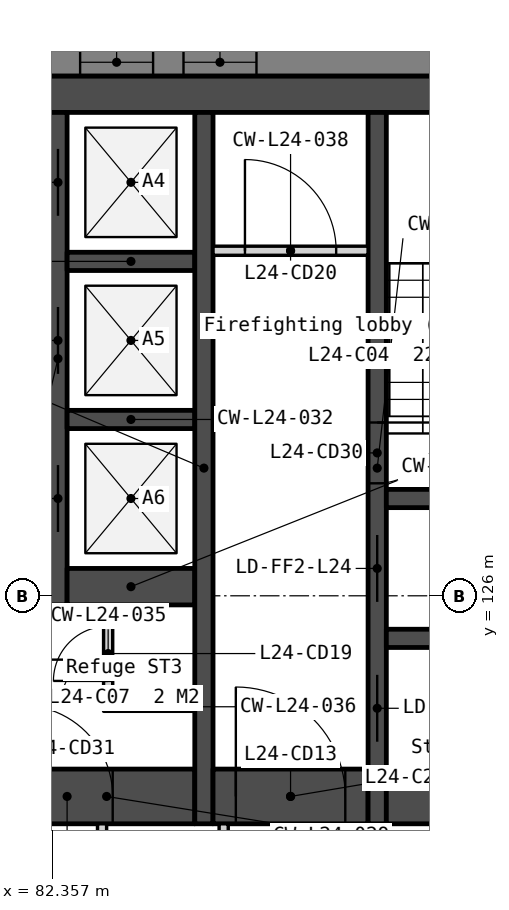
"""IFC4 building model, lengths in metres.
Left out: names, types, materials, properties, quantities, classifications, styles, units other than length and angle.
Written with IfcOpenShell. Run it as: python <this file> out.ifc"""

import sys

from ifc_helpers import new_model, si_unit, direction, frame, frame_2d, origin, place, context, subcontext, project, spatial, polyline, rectangle, outline, extrude, element, fill, save


model = new_model("IFC4")
c1 = context("Model", 3, precision=1e-05, world=origin(), true_north=direction((0.0, 1.0)))
c2 = subcontext(c1, "Body", "Model", "MODEL_VIEW")
j1 = project(units=[si_unit("LENGTHUNIT", "METRE"), si_unit("PLANEANGLEUNIT", "RADIAN")], contexts=[c1])
p1 = place(None, origin())
s1 = spatial("IfcSite", under=j1, at=p1, CompositionType="ELEMENT")
p2 = place(p1, origin())
s2 = spatial("IfcBuilding", under=s1, at=p2, CompositionType="ELEMENT")
p3 = place(p2, frame((0.0, 0.0, 99.3)))
s3 = spatial("IfcBuildingStorey", under=s2, at=p3, CompositionType="ELEMENT", Elevation=99.3)
p4 = place(p3, frame((66.0, 134.25, 0.0), z_axis=(0.0, 0.0, 1.0), x_axis=(1.0, 0.0, 0.0)))
e1 = element("IfcWall", 1, at=p4, inside=s3, PredefinedType="SOLIDWALL", context=c2, shape_type="SweptSolid", body=[
    extrude(rectangle(XDim=28.0, YDim=0.6, at=frame_2d((14.0, 0.0))), origin(), (0.0, 0.0, 1.0), 3.35),
])
p5 = place(p3, frame((81.8, 122.7, 0.0), z_axis=(0.0, 0.0, 1.0), x_axis=(1.0, 0.0, 0.0)))
e2 = element("IfcWall", 2, at=p5, inside=s3, PredefinedType="SOLIDWALL", context=c2, shape_type="SweptSolid", body=[
    extrude(rectangle(XDim=2.9, YDim=0.9, at=frame_2d((1.45, 0.0))), origin(), (0.0, 0.0, 1.0), 3.35),
])
p6 = place(p5, frame((0.05, 0.0, 0.0)))
e3 = element("IfcOpeningElement", 3, at=p6, cuts=e2, PredefinedType="OPENING", context=c2, shape_type="SweptSolid", body=[
    extrude(rectangle(XDim=1.5, YDim=2.1, at=frame_2d((0.75, 1.05))), frame((0.0, 0.46, 0.0), z_axis=(0.0, -1.0, 0.0), x_axis=(1.0, 0.0, 0.0)), (0.0, 0.0, 1.0), 0.92),
])
p7 = place(p3, frame((82.45, 133.95, 0.0), z_axis=(0.0, 0.0, 1.0), x_axis=(0.0, -1.0, 0.0)))
e4 = element("IfcWall", 4, at=p7, inside=s3, PredefinedType="SOLIDWALL", context=c2, shape_type="SweptSolid", body=[
    extrude(rectangle(XDim=8.1, YDim=0.3, at=frame_2d((4.05, 0.0))), origin(), (0.0, 0.0, 1.0), 3.35),
])
p8 = place(p7, frame((0.6, 0.0, 0.0)))
e5 = element("IfcOpeningElement", 5, at=p8, cuts=e4, PredefinedType="OPENING", context=c2, shape_type="SweptSolid", body=[
    extrude(rectangle(XDim=1.1, YDim=2.1, at=frame_2d((0.55, 1.05))), frame((0.0, 0.16, 0.0), z_axis=(0.0, -1.0, 0.0), x_axis=(1.0, 0.0, 0.0)), (0.0, 0.0, 1.0), 0.32),
])
p9 = place(p7, frame((3.2, 0.0, 0.0)))
e6 = element("IfcOpeningElement", 6, at=p9, cuts=e4, PredefinedType="OPENING", context=c2, shape_type="SweptSolid", body=[
    extrude(rectangle(XDim=1.1, YDim=2.1, at=frame_2d((0.55, 1.05))), frame((0.0, 0.16, 0.0), z_axis=(0.0, -1.0, 0.0), x_axis=(1.0, 0.0, 0.0)), (0.0, 0.0, 1.0), 0.32),
])
p10 = place(p7, frame((5.8, 0.0, 0.0)))
e7 = element("IfcOpeningElement", 7, at=p10, cuts=e4, PredefinedType="OPENING", context=c2, shape_type="SweptSolid", body=[
    extrude(rectangle(XDim=1.1, YDim=2.1, at=frame_2d((0.55, 1.05))), frame((0.0, 0.16, 0.0), z_axis=(0.0, -1.0, 0.0), x_axis=(1.0, 0.0, 0.0)), (0.0, 0.0, 1.0), 0.32),
])
for number, where, z_axis, x_axis in (
    (8, (82.6, 131.5, 0.0), (0.0, 0.0, 1.0), (1.0, 0.0, 0.0)),
    (9, (82.6, 128.9, 0.0), (0.0, 0.0, 1.0), (1.0, 0.0, 0.0)),
):
    element("IfcWall", number, at=place(p3, frame(where, z_axis=z_axis, x_axis=x_axis)), inside=s3, PredefinedType="SOLIDWALL", context=c2, shape_type="SweptSolid", body=[
        extrude(rectangle(XDim=2.1, YDim=0.3, at=frame_2d((1.05, 0.0))), origin(), (0.0, 0.0, 1.0), 3.35),
    ])
p11 = place(p3, frame((82.6, 126.15, 0.0), z_axis=(0.0, 0.0, 1.0), x_axis=(1.0, 0.0, 0.0)))
e10 = element("IfcWall", 10, at=p11, inside=s3, PredefinedType="SOLIDWALL", context=c2, shape_type="SweptSolid", body=[
    extrude(rectangle(XDim=2.1, YDim=0.6, at=frame_2d((1.05, 0.0))), origin(), (0.0, 0.0, 1.0), 3.35),
])
p12 = place(p3, frame((83.175, 122.25, 0.0), z_axis=(0.0, 0.0, 1.0), x_axis=(0.0, -1.0, 0.0)))
e11 = element("IfcWall", 11, at=p12, inside=s3, PredefinedType="PARTITIONING", context=c2, shape_type="SweptSolid", body=[
    extrude(rectangle(XDim=2.1, YDim=0.15, at=frame_2d((1.05, 0.0))), origin(), (0.0, 0.0, 1.0), 3.35),
])
p13 = place(p3, frame((83.275, 125.85, 0.0), z_axis=(0.0, 0.0, 1.0), x_axis=(0.0, -1.0, 0.0)))
e12 = element("IfcWall", 12, at=p13, inside=s3, PredefinedType="PARTITIONING", context=c2, shape_type="SweptSolid", body=[
    extrude(rectangle(XDim=1.75, YDim=0.15, at=frame_2d((0.875, 0.0))), origin(), (0.0, 0.0, 1.0), 3.35),
])
p14 = place(p13, frame((0.35, 0.0, 0.0)))
e13 = element("IfcOpeningElement", 13, at=p14, cuts=e12, PredefinedType="OPENING", context=c2, shape_type="SweptSolid", body=[
    extrude(rectangle(XDim=0.9, YDim=2.1, at=frame_2d((0.45, 1.05))), frame((0.0, 0.085, 0.0), z_axis=(0.0, -1.0, 0.0), x_axis=(1.0, 0.0, 0.0)), (0.0, 0.0, 1.0), 0.17),
])
p15 = place(p3, frame((83.35, 124.175, 0.0), z_axis=(0.0, 0.0, 1.0), x_axis=(1.0, 0.0, 0.0)))
e14 = element("IfcWall", 14, at=p15, inside=s3, PredefinedType="PARTITIONING", context=c2, shape_type="SweptSolid", body=[
    extrude(rectangle(XDim=1.35, YDim=0.15, at=frame_2d((0.675, 0.0))), origin(), (0.0, 0.0, 1.0), 3.35),
])
p16 = place(p3, frame((84.85, 133.95, 0.0), z_axis=(0.0, 0.0, 1.0), x_axis=(0.0, -1.0, 0.0)))
e15 = element("IfcWall", 15, at=p16, inside=s3, PredefinedType="SOLIDWALL", context=c2, shape_type="SweptSolid", body=[
    extrude(rectangle(XDim=11.7, YDim=0.3, at=frame_2d((5.85, 0.0))), origin(), (0.0, 0.0, 1.0), 3.35),
])
p17 = place(p3, frame((85.0, 131.675, 0.0), z_axis=(0.0, 0.0, 1.0), x_axis=(1.0, 0.0, 0.0)))
e16 = element("IfcWall", 16, at=p17, inside=s3, PredefinedType="PARTITIONING", context=c2, shape_type="SweptSolid", body=[
    extrude(rectangle(XDim=2.55, YDim=0.15, at=frame_2d((1.275, 0.0))), origin(), (0.0, 0.0, 1.0), 3.35),
])
p18 = place(p17, frame((0.525, 0.0, 0.0)))
e17 = element("IfcOpeningElement", 17, at=p18, cuts=e16, PredefinedType="OPENING", context=c2, shape_type="SweptSolid", body=[
    extrude(rectangle(XDim=1.5, YDim=2.1, at=frame_2d((0.75, 1.05))), frame((0.0, 0.085, 0.0), z_axis=(0.0, -1.0, 0.0), x_axis=(1.0, 0.0, 0.0)), (0.0, 0.0, 1.0), 0.17),
])
p19 = place(p3, frame((85.0, 122.7, 0.0), z_axis=(0.0, 0.0, 1.0), x_axis=(1.0, 0.0, 0.0)))
e18 = element("IfcWall", 18, at=p19, inside=s3, PredefinedType="SOLIDWALL", context=c2, shape_type="SweptSolid", body=[
    extrude(rectangle(XDim=2.55, YDim=0.9, at=frame_2d((1.275, 0.0))), origin(), (0.0, 0.0, 1.0), 3.35),
])
p20 = place(p19, frame((0.375, 0.0, 0.0)))
e19 = element("IfcOpeningElement", 19, at=p20, cuts=e18, PredefinedType="OPENING", context=c2, shape_type="SweptSolid", body=[
    extrude(rectangle(XDim=1.8, YDim=2.1, at=frame_2d((0.9, 1.05))), frame((0.0, 0.46, 0.0), z_axis=(0.0, -1.0, 0.0), x_axis=(1.0, 0.0, 0.0)), (0.0, 0.0, 1.0), 0.92),
])
p21 = place(p3, frame((85.175, 122.25, 0.0), z_axis=(0.0, 0.0, 1.0), x_axis=(0.0, -1.0, 0.0)))
e20 = element("IfcWall", 20, at=p21, inside=s3, PredefinedType="PARTITIONING", context=c2, shape_type="SweptSolid", body=[
    extrude(rectangle(XDim=2.1, YDim=0.15, at=frame_2d((1.05, 0.0))), origin(), (0.0, 0.0, 1.0), 3.35),
])
p22 = place(p21, frame((0.55, 0.0, 0.0)))
e21 = element("IfcOpeningElement", 21, at=p22, cuts=e20, PredefinedType="OPENING", context=c2, shape_type="SweptSolid", body=[
    extrude(rectangle(XDim=1.0, YDim=2.1, at=frame_2d((0.5, 1.05))), frame((0.0, 0.085, 0.0), z_axis=(0.0, -1.0, 0.0), x_axis=(1.0, 0.0, 0.0)), (0.0, 0.0, 1.0), 0.17),
])
p23 = place(p3, frame((87.375, 122.25, 0.0), z_axis=(0.0, 0.0, 1.0), x_axis=(0.0, -1.0, 0.0)))
e22 = element("IfcWall", 22, at=p23, inside=s3, PredefinedType="PARTITIONING", context=c2, shape_type="SweptSolid", body=[
    extrude(rectangle(XDim=2.1, YDim=0.15, at=frame_2d((1.05, 0.0))), origin(), (0.0, 0.0, 1.0), 3.35),
])
p24 = place(p3, frame((87.7, 133.95, 0.0), z_axis=(0.0, 0.0, 1.0), x_axis=(0.0, -1.0, 0.0)))
e23 = element("IfcWall", 23, at=p24, inside=s3, PredefinedType="SOLIDWALL", context=c2, shape_type="SweptSolid", body=[
    extrude(rectangle(XDim=11.7, YDim=0.3, at=frame_2d((5.85, 0.0))), origin(), (0.0, 0.0, 1.0), 3.35),
])
p25 = place(p24, frame((6.95, 0.0, 0.0)))
e24 = element("IfcOpeningElement", 24, at=p25, cuts=e23, PredefinedType="OPENING", context=c2, shape_type="SweptSolid", body=[
    extrude(rectangle(XDim=1.1, YDim=2.1, at=frame_2d((0.55, 1.05))), frame((0.0, 0.16, 0.0), z_axis=(0.0, -1.0, 0.0), x_axis=(1.0, 0.0, 0.0)), (0.0, 0.0, 1.0), 0.32),
])
p26 = place(p24, frame((5.1, 0.0, 0.0)))
e25 = element("IfcOpeningElement", 25, at=p26, cuts=e23, PredefinedType="OPENING", context=c2, shape_type="SweptSolid", body=[
    extrude(rectangle(XDim=1.0, YDim=2.1, at=frame_2d((0.5, 1.05))), frame((0.0, 0.16, 0.0), z_axis=(0.0, -1.0, 0.0), x_axis=(1.0, 0.0, 0.0)), (0.0, 0.0, 1.0), 0.32),
])
p27 = place(p24, frame((9.25, 0.0, 0.0)))
e26 = element("IfcOpeningElement", 26, at=p27, cuts=e23, PredefinedType="OPENING", context=c2, shape_type="SweptSolid", body=[
    extrude(rectangle(XDim=1.1, YDim=2.1, at=frame_2d((0.55, 1.05))), frame((0.0, 0.16, 0.0), z_axis=(0.0, -1.0, 0.0), x_axis=(1.0, 0.0, 0.0)), (0.0, 0.0, 1.0), 0.32),
])
for number, where, z_axis, x_axis in (
    (27, (87.85, 127.6, 0.0), (0.0, 0.0, 1.0), (1.0, 0.0, 0.0)),
    (28, (87.85, 125.3, 0.0), (0.0, 0.0, 1.0), (1.0, 0.0, 0.0)),
):
    element("IfcWall", number, at=place(p3, frame(where, z_axis=z_axis, x_axis=x_axis)), inside=s3, PredefinedType="SOLIDWALL", context=c2, shape_type="SweptSolid", body=[
        extrude(rectangle(XDim=2.55, YDim=0.3, at=frame_2d((1.275, 0.0))), origin(), (0.0, 0.0, 1.0), 3.35),
    ])
p28 = place(p3, frame((87.85, 122.7, 0.0), z_axis=(0.0, 0.0, 1.0), x_axis=(1.0, 0.0, 0.0)))
e29 = element("IfcWall", 29, at=p28, inside=s3, PredefinedType="SOLIDWALL", context=c2, shape_type="SweptSolid", body=[
    extrude(rectangle(XDim=2.55, YDim=0.9, at=frame_2d((1.275, 0.0))), origin(), (0.0, 0.0, 1.0), 3.35),
])
p29 = place(p3, frame((101.322, 134.775, -0.15), z_axis=(0.0, 0.0, 1.0), x_axis=(-1.0, 0.0, 0.0)))
e30 = element("IfcWall", 30, at=p29, inside=s3, PredefinedType="SOLIDWALL", context=c2, shape_type="SweptSolid", body=[
    extrude(outline(polyline([(42.643, 0.0), (42.643, 3.5), (0.0, 3.5), (0.0, 0.0), (42.643, 0.0)])), frame((0.0, 0.225, 0.0), z_axis=(0.0, -1.0, 0.0), x_axis=(1.0, 0.0, 0.0)), (0.0, 0.0, 1.0), 0.45),
])
p30 = place(p29, frame((7.079, 0.0, 1.05)))
e31 = element("IfcOpeningElement", 31, at=p30, cuts=e30, PredefinedType="OPENING", context=c2, shape_type="SweptSolid", body=[
    extrude(rectangle(XDim=1.2, YDim=1.5, at=frame_2d((0.6, 0.75))), frame((0.0, 0.235, 0.0), z_axis=(0.0, -1.0, 0.0), x_axis=(1.0, 0.0, 0.0)), (0.0, 0.0, 1.0), 0.47),
])
p31 = place(p29, frame((8.779, 0.0, 1.05)))
e32 = element("IfcOpeningElement", 32, at=p31, cuts=e30, PredefinedType="OPENING", context=c2, shape_type="SweptSolid", body=[
    extrude(rectangle(XDim=1.2, YDim=1.5, at=frame_2d((0.6, 0.75))), frame((0.0, 0.235, 0.0), z_axis=(0.0, -1.0, 0.0), x_axis=(1.0, 0.0, 0.0)), (0.0, 0.0, 1.0), 0.47),
])
p32 = place(p29, frame((15.607, 0.0, 1.05)))
e33 = element("IfcOpeningElement", 33, at=p32, cuts=e30, PredefinedType="OPENING", context=c2, shape_type="SweptSolid", body=[
    extrude(rectangle(XDim=1.2, YDim=1.5, at=frame_2d((0.6, 0.75))), frame((0.0, 0.235, 0.0), z_axis=(0.0, -1.0, 0.0), x_axis=(1.0, 0.0, 0.0)), (0.0, 0.0, 1.0), 0.47),
])
p33 = place(p29, frame((17.307, 0.0, 1.05)))
e34 = element("IfcOpeningElement", 34, at=p33, cuts=e30, PredefinedType="OPENING", context=c2, shape_type="SweptSolid", body=[
    extrude(rectangle(XDim=1.2, YDim=1.5, at=frame_2d((0.6, 0.75))), frame((0.0, 0.235, 0.0), z_axis=(0.0, -1.0, 0.0), x_axis=(1.0, 0.0, 0.0)), (0.0, 0.0, 1.0), 0.47),
])
p34 = place(p29, frame((24.136, 0.0, 1.05)))
e35 = element("IfcOpeningElement", 35, at=p34, cuts=e30, PredefinedType="OPENING", context=c2, shape_type="SweptSolid", body=[
    extrude(rectangle(XDim=1.2, YDim=1.5, at=frame_2d((0.6, 0.75))), frame((0.0, 0.235, 0.0), z_axis=(0.0, -1.0, 0.0), x_axis=(1.0, 0.0, 0.0)), (0.0, 0.0, 1.0), 0.47),
])
p35 = place(p29, frame((25.836, 0.0, 1.05)))
e36 = element("IfcOpeningElement", 36, at=p35, cuts=e30, PredefinedType="OPENING", context=c2, shape_type="SweptSolid", body=[
    extrude(rectangle(XDim=1.2, YDim=1.5, at=frame_2d((0.6, 0.75))), frame((0.0, 0.235, 0.0), z_axis=(0.0, -1.0, 0.0), x_axis=(1.0, 0.0, 0.0)), (0.0, 0.0, 1.0), 0.47),
])
p36 = place(p29, frame((32.665, 0.0, 1.05)))
e37 = element("IfcOpeningElement", 37, at=p36, cuts=e30, PredefinedType="OPENING", context=c2, shape_type="SweptSolid", body=[
    extrude(rectangle(XDim=1.2, YDim=1.5, at=frame_2d((0.6, 0.75))), frame((0.0, 0.235, 0.0), z_axis=(0.0, -1.0, 0.0), x_axis=(1.0, 0.0, 0.0)), (0.0, 0.0, 1.0), 0.47),
])
p37 = place(p29, frame((34.365, 0.0, 1.05)))
e38 = element("IfcOpeningElement", 38, at=p37, cuts=e30, PredefinedType="OPENING", context=c2, shape_type="SweptSolid", body=[
    extrude(rectangle(XDim=1.2, YDim=1.5, at=frame_2d((0.6, 0.75))), frame((0.0, 0.235, 0.0), z_axis=(0.0, -1.0, 0.0), x_axis=(1.0, 0.0, 0.0)), (0.0, 0.0, 1.0), 0.47),
])
p38 = place(p3, frame((82.605, 93.333, -0.15), z_axis=(0.0, 0.0, 1.0), x_axis=(0.500000478905, 0.866025127289, 0.0)))
e39 = element("IfcWall", 39, at=p38, inside=s3, PredefinedType="SOLIDWALL", context=c2, shape_type="SweptSolid", body=[
    extrude(outline(polyline([(42.643, 0.0), (42.643, 3.5), (0.0, 3.5), (0.0, 0.0), (42.643, 0.0)])), frame((0.0, 0.225, 0.0), z_axis=(0.0, -1.0, 0.0), x_axis=(1.0, 0.0, 0.0)), (0.0, 0.0, 1.0), 0.45),
])
p39 = place(p38, frame((7.079, 0.0, 1.05)))
e40 = element("IfcOpeningElement", 40, at=p39, cuts=e39, PredefinedType="OPENING", context=c2, shape_type="SweptSolid", body=[
    extrude(rectangle(XDim=1.2, YDim=1.5, at=frame_2d((0.6, 0.75))), frame((0.0, 0.235, 0.0), z_axis=(0.0, -1.0, 0.0), x_axis=(1.0, 0.0, 0.0)), (0.0, 0.0, 1.0), 0.47),
])
p40 = place(p38, frame((8.779, 0.0, 1.05)))
e41 = element("IfcOpeningElement", 41, at=p40, cuts=e39, PredefinedType="OPENING", context=c2, shape_type="SweptSolid", body=[
    extrude(rectangle(XDim=1.2, YDim=1.5, at=frame_2d((0.6, 0.75))), frame((0.0, 0.235, 0.0), z_axis=(0.0, -1.0, 0.0), x_axis=(1.0, 0.0, 0.0)), (0.0, 0.0, 1.0), 0.47),
])
p41 = place(p38, frame((15.607, 0.0, 1.05)))
e42 = element("IfcOpeningElement", 42, at=p41, cuts=e39, PredefinedType="OPENING", context=c2, shape_type="SweptSolid", body=[
    extrude(rectangle(XDim=1.2, YDim=1.5, at=frame_2d((0.6, 0.75))), frame((0.0, 0.235, 0.0), z_axis=(0.0, -1.0, 0.0), x_axis=(1.0, 0.0, 0.0)), (0.0, 0.0, 1.0), 0.47),
])
p42 = place(p38, frame((17.307, 0.0, 1.05)))
e43 = element("IfcOpeningElement", 43, at=p42, cuts=e39, PredefinedType="OPENING", context=c2, shape_type="SweptSolid", body=[
    extrude(rectangle(XDim=1.2, YDim=1.5, at=frame_2d((0.6, 0.75))), frame((0.0, 0.235, 0.0), z_axis=(0.0, -1.0, 0.0), x_axis=(1.0, 0.0, 0.0)), (0.0, 0.0, 1.0), 0.47),
])
p43 = place(p38, frame((24.136, 0.0, 1.05)))
e44 = element("IfcOpeningElement", 44, at=p43, cuts=e39, PredefinedType="OPENING", context=c2, shape_type="SweptSolid", body=[
    extrude(rectangle(XDim=1.2, YDim=1.5, at=frame_2d((0.6, 0.75))), frame((0.0, 0.235, 0.0), z_axis=(0.0, -1.0, 0.0), x_axis=(1.0, 0.0, 0.0)), (0.0, 0.0, 1.0), 0.47),
])
p44 = place(p38, frame((25.836, 0.0, 1.05)))
e45 = element("IfcOpeningElement", 45, at=p44, cuts=e39, PredefinedType="OPENING", context=c2, shape_type="SweptSolid", body=[
    extrude(rectangle(XDim=1.2, YDim=1.5, at=frame_2d((0.6, 0.75))), frame((0.0, 0.235, 0.0), z_axis=(0.0, -1.0, 0.0), x_axis=(1.0, 0.0, 0.0)), (0.0, 0.0, 1.0), 0.47),
])
p45 = place(p38, frame((32.665, 0.0, 1.05)))
e46 = element("IfcOpeningElement", 46, at=p45, cuts=e39, PredefinedType="OPENING", context=c2, shape_type="SweptSolid", body=[
    extrude(rectangle(XDim=1.2, YDim=1.5, at=frame_2d((0.6, 0.75))), frame((0.0, 0.235, 0.0), z_axis=(0.0, -1.0, 0.0), x_axis=(1.0, 0.0, 0.0)), (0.0, 0.0, 1.0), 0.47),
])
p46 = place(p38, frame((34.365, 0.0, 1.05)))
e47 = element("IfcOpeningElement", 47, at=p46, cuts=e39, PredefinedType="OPENING", context=c2, shape_type="SweptSolid", body=[
    extrude(rectangle(XDim=1.2, YDim=1.5, at=frame_2d((0.6, 0.75))), frame((0.0, 0.235, 0.0), z_axis=(0.0, -1.0, 0.0), x_axis=(1.0, 0.0, 0.0)), (0.0, 0.0, 1.0), 0.47),
])
p47 = place(p8, origin())
e48 = element("IfcDoor", 48, at=p47, inside=s3, OperationType="SLIDING_TO_LEFT", PredefinedType="DOOR", context=c2, shape_type="SweptSolid", body=[
    extrude(rectangle(XDim=1.1, YDim=2.1, at=frame_2d((0.55, 1.05))), frame((0.0, 0.025, 0.0), z_axis=(0.0, -1.0, 0.0), x_axis=(1.0, 0.0, 0.0)), (0.0, 0.0, 1.0), 0.05),
])
fill(e5, e48)
p48 = place(p9, origin())
e49 = element("IfcDoor", 49, at=p48, inside=s3, OperationType="SLIDING_TO_LEFT", PredefinedType="DOOR", context=c2, shape_type="SweptSolid", body=[
    extrude(rectangle(XDim=1.1, YDim=2.1, at=frame_2d((0.55, 1.05))), frame((0.0, 0.025, 0.0), z_axis=(0.0, -1.0, 0.0), x_axis=(1.0, 0.0, 0.0)), (0.0, 0.0, 1.0), 0.05),
])
fill(e6, e49)
p49 = place(p10, origin())
e50 = element("IfcDoor", 50, at=p49, inside=s3, OperationType="SLIDING_TO_LEFT", PredefinedType="DOOR", context=c2, shape_type="SweptSolid", body=[
    extrude(rectangle(XDim=1.1, YDim=2.1, at=frame_2d((0.55, 1.05))), frame((0.0, 0.025, 0.0), z_axis=(0.0, -1.0, 0.0), x_axis=(1.0, 0.0, 0.0)), (0.0, 0.0, 1.0), 0.05),
])
fill(e7, e50)
p50 = place(p25, origin())
e51 = element("IfcDoor", 51, at=p50, inside=s3, OperationType="SLIDING_TO_LEFT", PredefinedType="DOOR", context=c2, shape_type="SweptSolid", body=[
    extrude(rectangle(XDim=1.1, YDim=2.1, at=frame_2d((0.55, 1.05))), frame((0.0, 0.025, 0.0), z_axis=(0.0, -1.0, 0.0), x_axis=(1.0, 0.0, 0.0)), (0.0, 0.0, 1.0), 0.05),
])
fill(e24, e51)
p51 = place(p20, origin())
e52 = element("IfcDoor", 52, at=p51, inside=s3, OperationType="DOUBLE_DOOR_DOUBLE_SWING", PredefinedType="DOOR", context=c2, shape_type="SweptSolid", body=[
    extrude(rectangle(XDim=1.8, YDim=2.1, at=frame_2d((0.9, 1.05))), frame((0.0, 0.025, 0.0), z_axis=(0.0, -1.0, 0.0), x_axis=(1.0, 0.0, 0.0)), (0.0, 0.0, 1.0), 0.05),
])
fill(e19, e52)
p52 = place(p6, origin())
e53 = element("IfcDoor", 53, at=p52, inside=s3, OperationType="DOUBLE_DOOR_DOUBLE_SWING", PredefinedType="DOOR", context=c2, shape_type="SweptSolid", body=[
    extrude(rectangle(XDim=1.5, YDim=2.1, at=frame_2d((0.75, 1.05))), frame((0.0, 0.025, 0.0), z_axis=(0.0, -1.0, 0.0), x_axis=(1.0, 0.0, 0.0)), (0.0, 0.0, 1.0), 0.05),
])
fill(e3, e53)
p53 = place(p14, origin())
e54 = element("IfcDoor", 54, at=p53, inside=s3, OperationType="SINGLE_SWING_RIGHT", PredefinedType="DOOR", context=c2, shape_type="SweptSolid", body=[
    extrude(rectangle(XDim=0.9, YDim=2.1, at=frame_2d((0.45, 1.05))), frame((0.0, 0.025, 0.0), z_axis=(0.0, -1.0, 0.0), x_axis=(1.0, 0.0, 0.0)), (0.0, 0.0, 1.0), 0.05),
])
fill(e13, e54)
p54 = place(p18, origin())
e55 = element("IfcDoor", 55, at=p54, inside=s3, OperationType="DOUBLE_DOOR_DOUBLE_SWING", PredefinedType="DOOR", context=c2, shape_type="SweptSolid", body=[
    extrude(rectangle(XDim=1.5, YDim=2.1, at=frame_2d((0.75, 1.05))), frame((0.0, 0.025, 0.0), z_axis=(0.0, -1.0, 0.0), x_axis=(1.0, 0.0, 0.0)), (0.0, 0.0, 1.0), 0.05),
])
fill(e17, e55)
p55 = place(p26, origin())
e56 = element("IfcDoor", 56, at=p55, inside=s3, OperationType="SINGLE_SWING_LEFT", PredefinedType="DOOR", context=c2, shape_type="SweptSolid", body=[
    extrude(rectangle(XDim=1.0, YDim=2.1, at=frame_2d((0.5, 1.05))), frame((0.0, 0.025, 0.0), z_axis=(0.0, -1.0, 0.0), x_axis=(1.0, 0.0, 0.0)), (0.0, 0.0, 1.0), 0.05),
])
fill(e25, e56)
p56 = place(p27, origin())
e57 = element("IfcDoor", 57, at=p56, inside=s3, OperationType="SLIDING_TO_LEFT", PredefinedType="DOOR", context=c2, shape_type="SweptSolid", body=[
    extrude(rectangle(XDim=1.1, YDim=2.1, at=frame_2d((0.55, 1.05))), frame((0.0, 0.025, 0.0), z_axis=(0.0, -1.0, 0.0), x_axis=(1.0, 0.0, 0.0)), (0.0, 0.0, 1.0), 0.05),
])
fill(e26, e57)
p57 = place(p32, origin())
e58 = element("IfcWindow", 58, at=p57, inside=s3, PartitioningType="SINGLE_PANEL", PredefinedType="WINDOW", context=c2, shape_type="SweptSolid", body=[
    extrude(rectangle(XDim=1.2, YDim=1.5, at=frame_2d((0.6, 0.75))), frame((0.0, 0.03, 0.0), z_axis=(0.0, -1.0, 0.0), x_axis=(1.0, 0.0, 0.0)), (0.0, 0.0, 1.0), 0.06),
])
fill(e33, e58)
p58 = place(p33, origin())
e59 = element("IfcWindow", 59, at=p58, inside=s3, PartitioningType="SINGLE_PANEL", PredefinedType="WINDOW", context=c2, shape_type="SweptSolid", body=[
    extrude(rectangle(XDim=1.2, YDim=1.5, at=frame_2d((0.6, 0.75))), frame((0.0, 0.03, 0.0), z_axis=(0.0, -1.0, 0.0), x_axis=(1.0, 0.0, 0.0)), (0.0, 0.0, 1.0), 0.06),
])
fill(e34, e59)
save(model, sys.argv[1])
